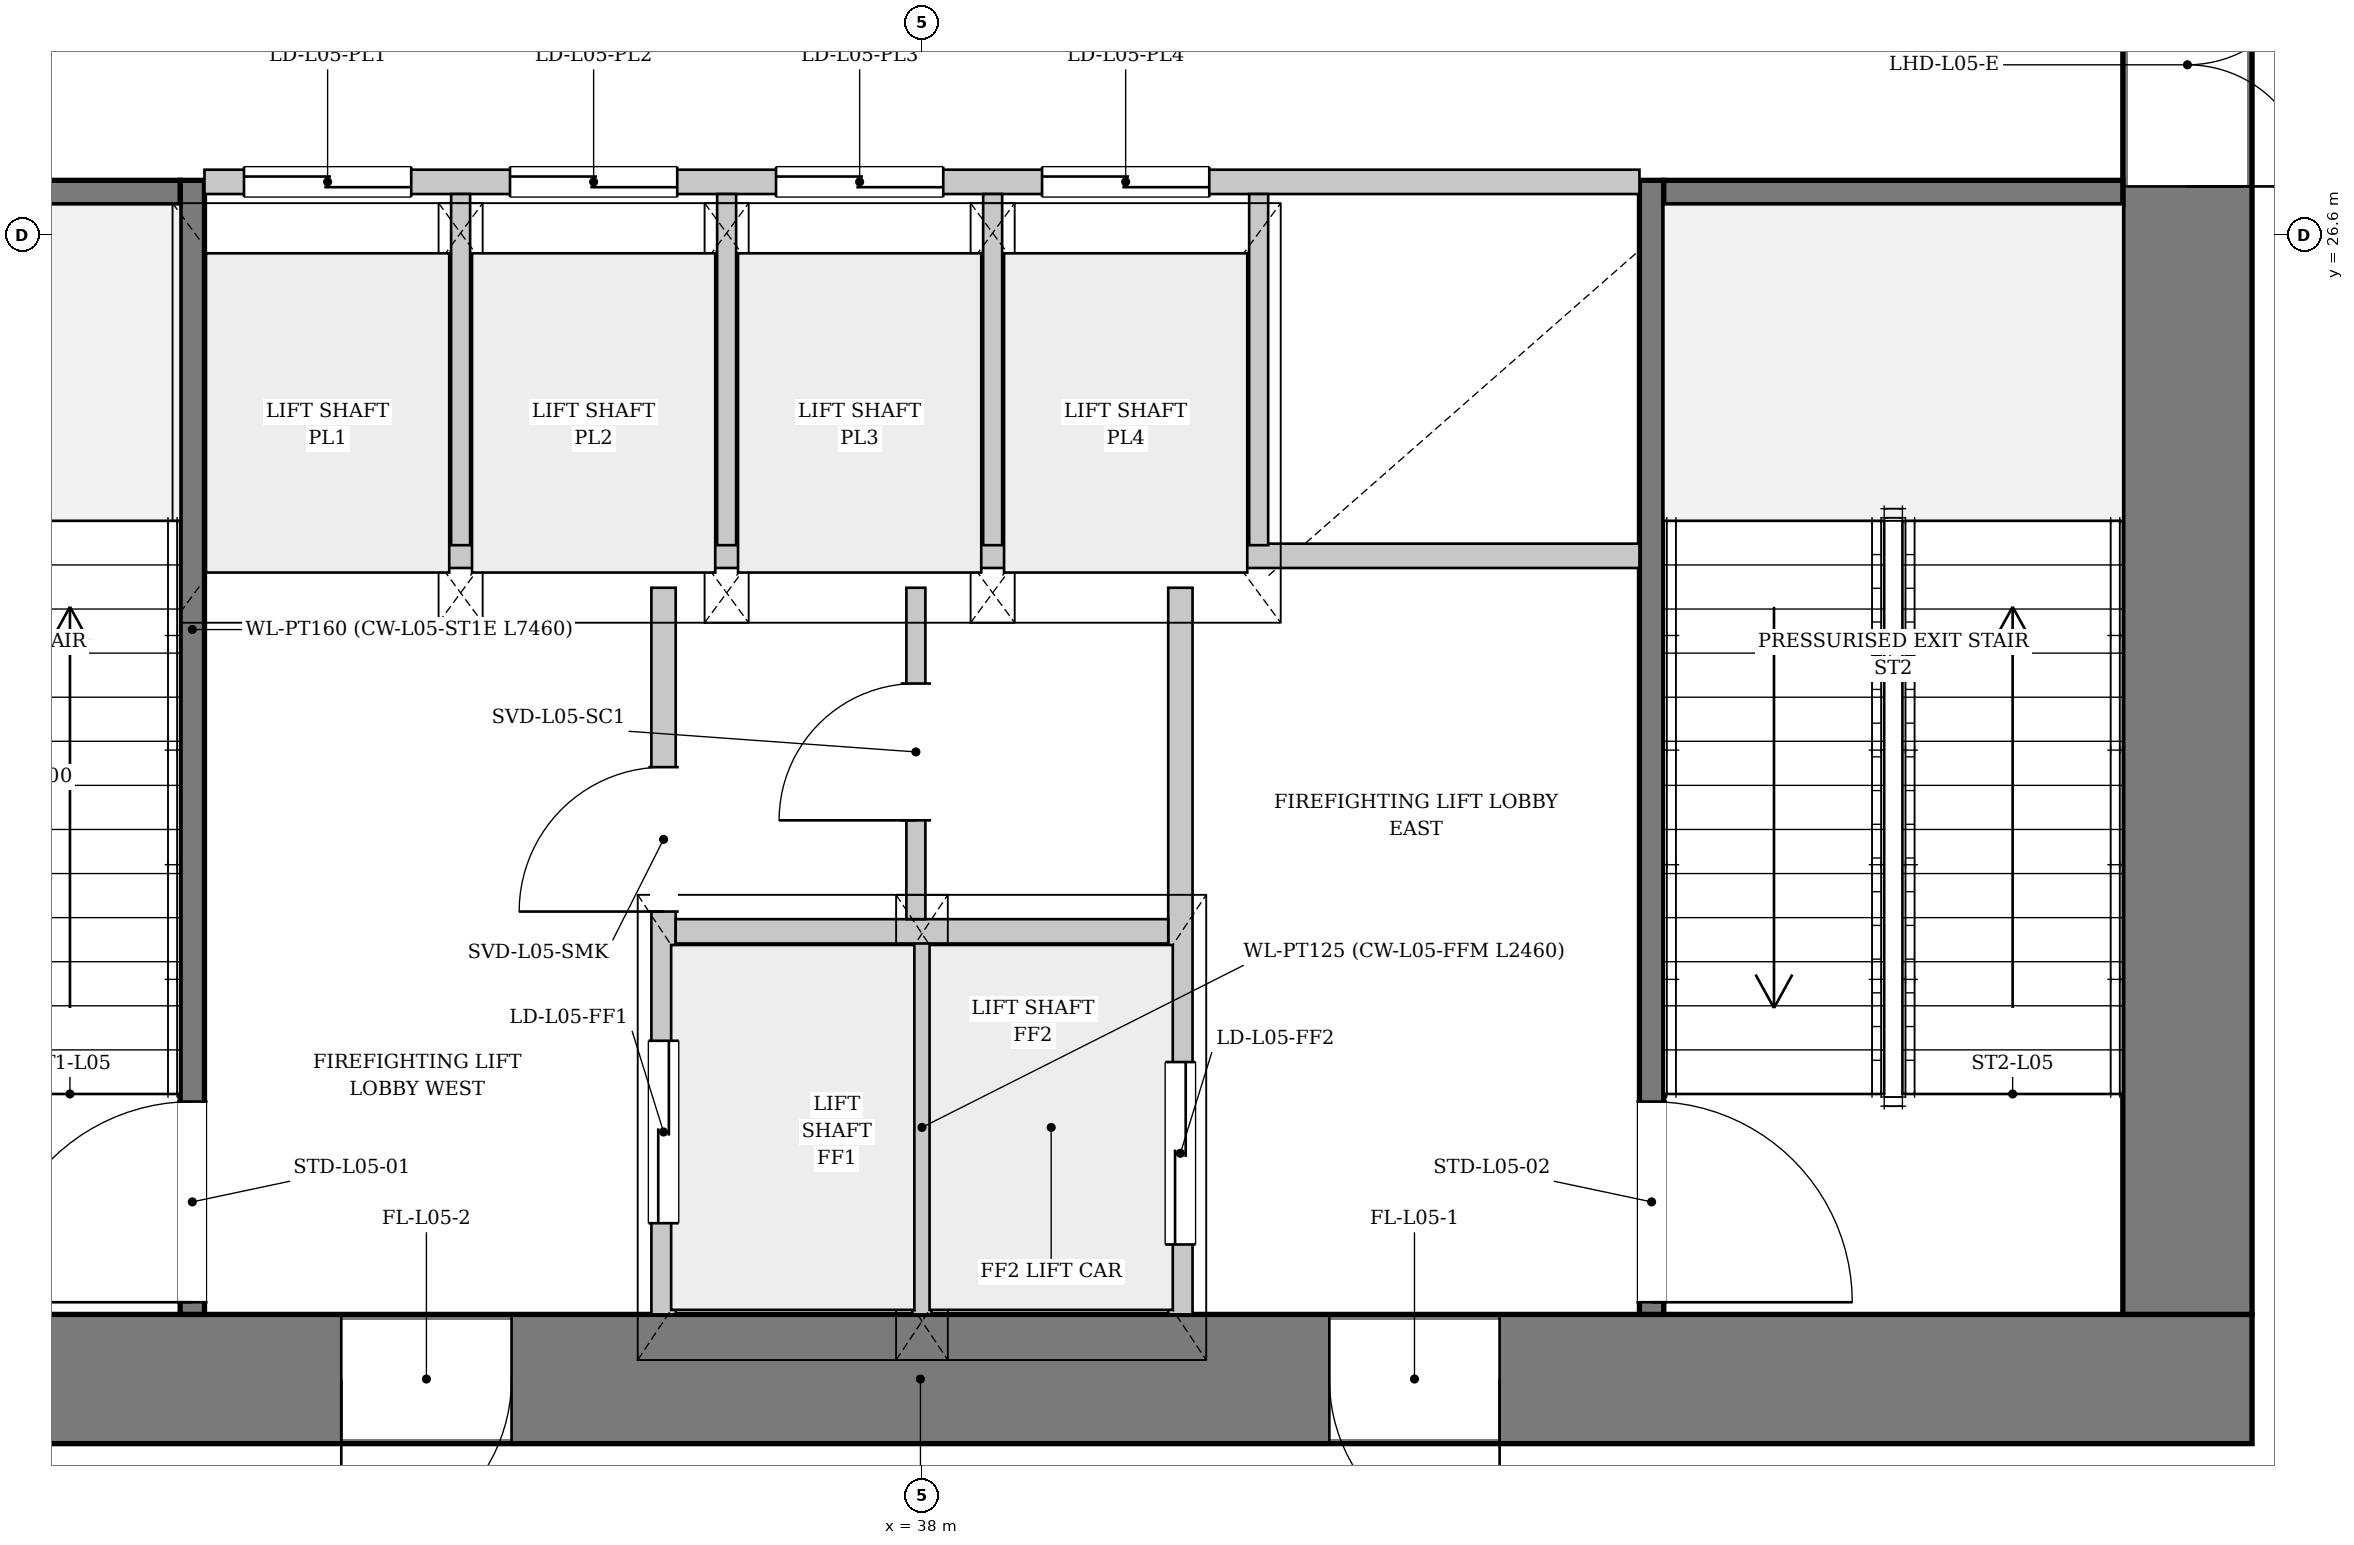
"""IFC4 building model, lengths in metres.
Left out: names, types, materials, properties, quantities, classifications, styles, units other than length and angle.
Written with IfcOpenShell. Run it as: python <this file> out.ifc"""

import sys

from ifc_helpers import new_model, si_unit, direction, frame, frame_2d, origin, place, context, subcontext, project, spatial, rectangle, extrude, source, transform, mapped, element, fill, save


model = new_model("IFC4")
c1 = context("Model", 3, precision=1e-05, world=origin(), true_north=direction((0.0, 1.0)))
c2 = subcontext(c1, "Body", "Model", "MODEL_VIEW")
j1 = project(units=[si_unit("LENGTHUNIT", "METRE"), si_unit("PLANEANGLEUNIT", "RADIAN")], contexts=[c1])
p1 = place(None, origin())
s1 = spatial("IfcSite", under=j1, at=p1, CompositionType="ELEMENT")
p2 = place(p1, origin())
s2 = spatial("IfcBuilding", under=s1, at=p2, CompositionType="ELEMENT")
p3 = place(p2, frame((0.0, 0.0, 24.6)))
s3 = spatial("IfcBuildingStorey", under=s2, at=p3, CompositionType="ELEMENT", Elevation=24.6)
p4 = place(p3, frame((46.75, 19.075, 0.0), z_axis=(0.0, 0.0, 1.0), x_axis=(-1.0, 0.0, 0.0)))
e1 = element("IfcWall", 1, at=p4, inside=s3, PredefinedType="SHEAR", context=c2, shape_type="SweptSolid", body=[
    extrude(rectangle(XDim=17.5, YDim=0.85, at=frame_2d((8.75, 0.0))), origin(), (0.0, 0.0, 1.0), 4.45),
])
p5 = place(p4, frame((4.95, 0.0, 0.0)))
e2 = element("IfcOpeningElement", 2, at=p5, cuts=e1, PredefinedType="OPENING", context=c2, shape_type="SweptSolid", body=[
    extrude(rectangle(XDim=1.12, YDim=2.25, at=frame_2d((0.56, 1.125))), frame((0.0, 0.435, 0.0), z_axis=(0.0, -1.0, 0.0), x_axis=(1.0, 0.0, 0.0)), (0.0, 0.0, 1.0), 0.87),
])
p6 = place(p4, frame((11.45, 0.0, 0.0)))
e3 = element("IfcOpeningElement", 3, at=p6, cuts=e1, PredefinedType="OPENING", context=c2, shape_type="SweptSolid", body=[
    extrude(rectangle(XDim=1.12, YDim=2.25, at=frame_2d((0.56, 1.125))), frame((0.0, 0.435, 0.0), z_axis=(0.0, -1.0, 0.0), x_axis=(1.0, 0.0, 0.0)), (0.0, 0.0, 1.0), 0.87),
])
p7 = place(p3, frame((46.325, 33.7, 0.0), z_axis=(0.0, 0.0, 1.0), x_axis=(0.0, -1.0, 0.0)))
e4 = element("IfcWall", 4, at=p7, inside=s3, PredefinedType="SHEAR", context=c2, shape_type="SweptSolid", body=[
    extrude(rectangle(XDim=14.2, YDim=0.85, at=frame_2d((7.1, 0.0))), origin(), (0.0, 0.0, 1.0), 4.45),
])
p8 = place(p7, frame((5.18, 0.0, 0.0)))
e5 = element("IfcOpeningElement", 5, at=p8, cuts=e4, PredefinedType="OPENING", context=c2, shape_type="SweptSolid", body=[
    extrude(rectangle(XDim=1.6, YDim=2.2, at=frame_2d((0.8, 1.1))), frame((0.0, 0.435, 0.0), z_axis=(0.0, -1.0, 0.0), x_axis=(1.0, 0.0, 0.0)), (0.0, 0.0, 1.0), 0.87),
])
p9 = place(p3, frame((33.2, 19.5, 0.0), z_axis=(0.0, 0.0, 1.0), x_axis=(0.0, 1.0, 0.0)))
e6 = element("IfcWall", 6, at=p9, inside=s3, PredefinedType="PARTITIONING", context=c2, shape_type="SweptSolid", body=[
    extrude(rectangle(XDim=7.46, YDim=0.16, at=frame_2d((3.73, 0.0))), origin(), (0.0, 0.0, 1.0), 4.45),
])
p10 = place(p9, frame((0.08, 0.0, 0.0)))
e7 = element("IfcOpeningElement", 7, at=p10, cuts=e6, PredefinedType="OPENING", context=c2, shape_type="SweptSolid", body=[
    extrude(rectangle(XDim=1.32, YDim=2.2, at=frame_2d((0.66, 1.1))), frame((0.0, 0.09, 0.0), z_axis=(0.0, -1.0, 0.0), x_axis=(1.0, 0.0, 0.0)), (0.0, 0.0, 1.0), 0.18),
])
p11 = place(p3, frame((30.1, 26.88, 0.0), z_axis=(0.0, 0.0, 1.0), x_axis=(1.0, 0.0, 0.0)))
e8 = element("IfcWall", 8, at=p11, inside=s3, PredefinedType="PARTITIONING", context=c2, shape_type="SweptSolid", body=[
    extrude(rectangle(XDim=3.02, YDim=0.16, at=frame_2d((1.51, 0.0))), origin(), (0.0, 0.0, 1.0), 4.45),
])
p12 = place(p3, frame((42.8, 26.96, 0.0), z_axis=(0.0, 0.0, 1.0), x_axis=(0.0, -1.0, 0.0)))
e9 = element("IfcWall", 9, at=p12, inside=s3, PredefinedType="PARTITIONING", context=c2, shape_type="SweptSolid", body=[
    extrude(rectangle(XDim=7.46, YDim=0.16, at=frame_2d((3.73, 0.0))), origin(), (0.0, 0.0, 1.0), 4.45),
])
p13 = place(p12, frame((6.06, 0.0, 0.0)))
e10 = element("IfcOpeningElement", 10, at=p13, cuts=e9, PredefinedType="OPENING", context=c2, shape_type="SweptSolid", body=[
    extrude(rectangle(XDim=1.32, YDim=2.2, at=frame_2d((0.66, 1.1))), frame((0.0, 0.09, 0.0), z_axis=(0.0, -1.0, 0.0), x_axis=(1.0, 0.0, 0.0)), (0.0, 0.0, 1.0), 0.18),
])
p14 = place(p3, frame((42.88, 26.88, 0.0), z_axis=(0.0, 0.0, 1.0), x_axis=(1.0, 0.0, 0.0)))
e11 = element("IfcWall", 11, at=p14, inside=s3, PredefinedType="PARTITIONING", context=c2, shape_type="SweptSolid", body=[
    extrude(rectangle(XDim=3.02, YDim=0.16, at=frame_2d((1.51, 0.0))), origin(), (0.0, 0.0, 1.0), 4.45),
])
p15 = place(p3, frame((36.3, 19.5, 0.0), z_axis=(0.0, 0.0, 1.0), x_axis=(0.0, 1.0, 0.0)))
e12 = element("IfcWall", 12, at=p15, inside=s3, PredefinedType="PARTITIONING", context=c2, shape_type="SweptSolid", body=[
    extrude(rectangle(XDim=4.78, YDim=0.16, at=frame_2d((2.39, 0.0))), origin(), (0.0, 0.0, 1.0), 4.45),
])
p16 = place(p15, frame((0.6, 0.0, 0.0)))
e13 = element("IfcOpeningElement", 13, at=p16, cuts=e12, PredefinedType="OPENING", context=c2, shape_type="SweptSolid", body=[
    extrude(rectangle(XDim=1.2, YDim=2.2, at=frame_2d((0.6, 1.1))), frame((0.0, 0.09, 0.0), z_axis=(0.0, -1.0, 0.0), x_axis=(1.0, 0.0, 0.0)), (0.0, 0.0, 1.0), 0.18),
])
p17 = place(p15, frame((2.65, 0.0, 0.0)))
e14 = element("IfcOpeningElement", 14, at=p17, cuts=e12, PredefinedType="OPENING", context=c2, shape_type="SweptSolid", body=[
    extrude(rectangle(XDim=0.95, YDim=2.1, at=frame_2d((0.475, 1.05))), frame((0.0, 0.09, 0.0), z_axis=(0.0, -1.0, 0.0), x_axis=(1.0, 0.0, 0.0)), (0.0, 0.0, 1.0), 0.18),
])
p18 = place(p3, frame((39.7, 24.28, 0.0), z_axis=(0.0, 0.0, 1.0), x_axis=(0.0, -1.0, 0.0)))
e15 = element("IfcWall", 15, at=p18, inside=s3, PredefinedType="PARTITIONING", context=c2, shape_type="SweptSolid", body=[
    extrude(rectangle(XDim=4.78, YDim=0.16, at=frame_2d((2.39, 0.0))), origin(), (0.0, 0.0, 1.0), 4.45),
])
p19 = place(p18, frame((3.12, 0.0, 0.0)))
e16 = element("IfcOpeningElement", 16, at=p19, cuts=e15, PredefinedType="OPENING", context=c2, shape_type="SweptSolid", body=[
    extrude(rectangle(XDim=1.2, YDim=2.2, at=frame_2d((0.6, 1.1))), frame((0.0, 0.09, 0.0), z_axis=(0.0, -1.0, 0.0), x_axis=(1.0, 0.0, 0.0)), (0.0, 0.0, 1.0), 0.18),
])
p20 = place(p3, frame((38.0, 19.5, 0.0), z_axis=(0.0, 0.0, 1.0), x_axis=(0.0, 1.0, 0.0)))
e17 = element("IfcWall", 17, at=p20, inside=s3, PredefinedType="PARTITIONING", context=c2, shape_type="SweptSolid", body=[
    extrude(rectangle(XDim=2.46, YDim=0.125, at=frame_2d((1.23, 0.0))), origin(), (0.0, 0.0, 1.0), 4.45),
])
p21 = place(p3, frame((36.38, 22.02, 0.0), z_axis=(0.0, 0.0, 1.0), x_axis=(1.0, 0.0, 0.0)))
e18 = element("IfcWall", 18, at=p21, inside=s3, PredefinedType="PARTITIONING", context=c2, shape_type="SweptSolid", body=[
    extrude(rectangle(XDim=3.24, YDim=0.16, at=frame_2d((1.62, 0.0))), origin(), (0.0, 0.0, 1.0), 4.45),
])
p22 = place(p3, frame((33.28, 24.49, 0.0), z_axis=(0.0, 0.0, 1.0), x_axis=(1.0, 0.0, 0.0)))
e19 = element("IfcWall", 19, at=p22, inside=s3, PredefinedType="PARTITIONING", context=c2, shape_type="SweptSolid", body=[
    extrude(rectangle(XDim=9.44, YDim=0.16, at=frame_2d((4.72, 0.0))), origin(), (0.0, 0.0, 1.0), 4.45),
])
p23 = place(p3, frame((37.96, 22.1, 0.0), z_axis=(0.0, 0.0, 1.0), x_axis=(0.0, 1.0, 0.0)))
e20 = element("IfcWall", 20, at=p23, inside=s3, PredefinedType="PARTITIONING", context=c2, shape_type="SweptSolid", body=[
    extrude(rectangle(XDim=2.18, YDim=0.125, at=frame_2d((1.09, 0.0))), origin(), (0.0, 0.0, 1.0), 4.45),
])
p24 = place(p23, frame((0.65, 0.0, 0.0)))
e21 = element("IfcOpeningElement", 21, at=p24, cuts=e20, PredefinedType="OPENING", context=c2, shape_type="SweptSolid", body=[
    extrude(rectangle(XDim=0.9, YDim=2.1, at=frame_2d((0.45, 1.05))), frame((0.0, 0.073, 0.0), z_axis=(0.0, -1.0, 0.0), x_axis=(1.0, 0.0, 0.0)), (0.0, 0.0, 1.0), 0.145),
])
p25 = place(p3, frame((33.28, 26.95, 0.0), z_axis=(0.0, 0.0, 1.0), x_axis=(1.0, 0.0, 0.0)))
e22 = element("IfcWall", 22, at=p25, inside=s3, PredefinedType="PARTITIONING", context=c2, shape_type="SweptSolid", body=[
    extrude(rectangle(XDim=9.44, YDim=0.16, at=frame_2d((4.72, 0.0))), origin(), (0.0, 0.0, 1.0), 4.45),
])
p26 = place(p25, frame((0.26, 0.0, 0.0)))
e23 = element("IfcOpeningElement", 23, at=p26, cuts=e22, PredefinedType="OPENING", context=c2, shape_type="SweptSolid", body=[
    extrude(rectangle(XDim=1.1, YDim=2.2, at=frame_2d((0.55, 1.1))), frame((0.0, 0.09, 0.0), z_axis=(0.0, -1.0, 0.0), x_axis=(1.0, 0.0, 0.0)), (0.0, 0.0, 1.0), 0.18),
])
p27 = place(p25, frame((2.01, 0.0, 0.0)))
e24 = element("IfcOpeningElement", 24, at=p27, cuts=e22, PredefinedType="OPENING", context=c2, shape_type="SweptSolid", body=[
    extrude(rectangle(XDim=1.1, YDim=2.2, at=frame_2d((0.55, 1.1))), frame((0.0, 0.09, 0.0), z_axis=(0.0, -1.0, 0.0), x_axis=(1.0, 0.0, 0.0)), (0.0, 0.0, 1.0), 0.18),
])
p28 = place(p25, frame((3.76, 0.0, 0.0)))
e25 = element("IfcOpeningElement", 25, at=p28, cuts=e22, PredefinedType="OPENING", context=c2, shape_type="SweptSolid", body=[
    extrude(rectangle(XDim=1.1, YDim=2.2, at=frame_2d((0.55, 1.1))), frame((0.0, 0.09, 0.0), z_axis=(0.0, -1.0, 0.0), x_axis=(1.0, 0.0, 0.0)), (0.0, 0.0, 1.0), 0.18),
])
p29 = place(p25, frame((5.51, 0.0, 0.0)))
e26 = element("IfcOpeningElement", 26, at=p29, cuts=e22, PredefinedType="OPENING", context=c2, shape_type="SweptSolid", body=[
    extrude(rectangle(XDim=1.1, YDim=2.2, at=frame_2d((0.55, 1.1))), frame((0.0, 0.09, 0.0), z_axis=(0.0, -1.0, 0.0), x_axis=(1.0, 0.0, 0.0)), (0.0, 0.0, 1.0), 0.18),
])
for number, where, z_axis, x_axis in (
    (27, (34.965, 24.56, 0.0), (0.0, 0.0, 1.0), (0.0, 1.0, 0.0)),
    (28, (36.715, 24.56, 0.0), (0.0, 0.0, 1.0), (0.0, 1.0, 0.0)),
    (29, (38.465, 24.56, 0.0), (0.0, 0.0, 1.0), (0.0, 1.0, 0.0)),
    (30, (40.215, 24.56, 0.0), (0.0, 0.0, 1.0), (0.0, 1.0, 0.0)),
):
    element("IfcWall", number, at=place(p3, frame(where, z_axis=z_axis, x_axis=x_axis)), inside=s3, PredefinedType="PARTITIONING", context=c2, shape_type="SweptSolid", body=[
        extrude(rectangle(XDim=2.31, YDim=0.125, at=frame_2d((1.155, 0.0))), origin(), (0.0, 0.0, 1.0), 4.45),
    ])
m1 = source(origin(), c2, "Body", "SweptSolid", [
    extrude(rectangle(XDim=1.12, YDim=2.25, at=frame_2d((0.56, 1.125))), frame((0.0, 0.025, 0.0), z_axis=(0.0, -1.0, 0.0), x_axis=(1.0, 0.0, 0.0)), (0.0, 0.0, 1.0), 0.05),
])
p30 = place(p5, origin())
e31 = element("IfcDoor", 31, at=p30, inside=s3, OperationType="SINGLE_SWING_LEFT", PredefinedType="DOOR", context=c2, shape_type="MappedRepresentation", body=[
    mapped(m1, transform((0.0, 0.0, 0.0), x_axis=(1.0, 0.0, 0.0), y_axis=(0.0, 1.0, 0.0), z_axis=(0.0, 0.0, 1.0), scale=1.0)),
])
fill(e2, e31)
p31 = place(p6, origin())
e32 = element("IfcDoor", 32, at=p31, inside=s3, OperationType="SINGLE_SWING_RIGHT", PredefinedType="DOOR", context=c2, shape_type="MappedRepresentation", body=[
    mapped(m1, transform((0.0, 0.0, 0.0), x_axis=(1.0, 0.0, 0.0), y_axis=(0.0, 1.0, 0.0), z_axis=(0.0, 0.0, 1.0), scale=1.0)),
])
fill(e3, e32)
m2 = source(origin(), c2, "Body", "SweptSolid", [
    extrude(rectangle(XDim=1.6, YDim=2.2, at=frame_2d((0.8, 1.1))), frame((0.0, 0.025, 0.0), z_axis=(0.0, -1.0, 0.0), x_axis=(1.0, 0.0, 0.0)), (0.0, 0.0, 1.0), 0.05),
])
p32 = place(p8, origin())
e33 = element("IfcDoor", 33, at=p32, inside=s3, OperationType="DOUBLE_DOOR_SINGLE_SWING", PredefinedType="DOOR", context=c2, shape_type="MappedRepresentation", body=[
    mapped(m2, transform((0.0, 0.0, 0.0), x_axis=(1.0, 0.0, 0.0), y_axis=(0.0, 1.0, 0.0), z_axis=(0.0, 0.0, 1.0), scale=1.0)),
])
fill(e5, e33)
m3 = source(origin(), c2, "Body", "SweptSolid", [
    extrude(rectangle(XDim=1.32, YDim=2.2, at=frame_2d((0.66, 1.1))), frame((0.0, 0.025, 0.0), z_axis=(0.0, -1.0, 0.0), x_axis=(1.0, 0.0, 0.0)), (0.0, 0.0, 1.0), 0.05),
])
p33 = place(p10, origin())
e34 = element("IfcDoor", 34, at=p33, inside=s3, OperationType="SINGLE_SWING_LEFT", PredefinedType="DOOR", context=c2, shape_type="MappedRepresentation", body=[
    mapped(m3, transform((0.0, 0.0, 0.0), x_axis=(1.0, 0.0, 0.0), y_axis=(0.0, 1.0, 0.0), z_axis=(0.0, 0.0, 1.0), scale=1.0)),
])
fill(e7, e34)
p34 = place(p13, origin())
e35 = element("IfcDoor", 35, at=p34, inside=s3, OperationType="SINGLE_SWING_RIGHT", PredefinedType="DOOR", context=c2, shape_type="MappedRepresentation", body=[
    mapped(m3, transform((0.0, 0.0, 0.0), x_axis=(1.0, 0.0, 0.0), y_axis=(0.0, 1.0, 0.0), z_axis=(0.0, 0.0, 1.0), scale=1.0)),
])
fill(e10, e35)
m4 = source(origin(), c2, "Body", "SweptSolid", [
    extrude(rectangle(XDim=1.2, YDim=2.2, at=frame_2d((0.6, 1.1))), frame((0.0, 0.025, 0.0), z_axis=(0.0, -1.0, 0.0), x_axis=(1.0, 0.0, 0.0)), (0.0, 0.0, 1.0), 0.05),
])
p35 = place(p16, origin())
e36 = element("IfcDoor", 36, at=p35, inside=s3, OperationType="DOUBLE_DOOR_SLIDING", PredefinedType="DOOR", context=c2, shape_type="MappedRepresentation", body=[
    mapped(m4, transform((0.0, 0.0, 0.0), x_axis=(1.0, 0.0, 0.0), y_axis=(0.0, 1.0, 0.0), z_axis=(0.0, 0.0, 1.0), scale=1.0)),
])
fill(e13, e36)
m5 = source(origin(), c2, "Body", "SweptSolid", [
    extrude(rectangle(XDim=0.95, YDim=2.1, at=frame_2d((0.475, 1.05))), frame((0.0, 0.025, 0.0), z_axis=(0.0, -1.0, 0.0), x_axis=(1.0, 0.0, 0.0)), (0.0, 0.0, 1.0), 0.05),
])
p36 = place(p17, origin())
e37 = element("IfcDoor", 37, at=p36, inside=s3, OperationType="SINGLE_SWING_LEFT", PredefinedType="DOOR", context=c2, shape_type="MappedRepresentation", body=[
    mapped(m5, transform((0.0, 0.0, 0.0), x_axis=(1.0, 0.0, 0.0), y_axis=(0.0, 1.0, 0.0), z_axis=(0.0, 0.0, 1.0), scale=1.0)),
])
fill(e14, e37)
m6 = source(origin(), c2, "Body", "SweptSolid", [
    extrude(rectangle(XDim=0.9, YDim=2.1, at=frame_2d((0.45, 1.05))), frame((0.0, 0.025, 0.0), z_axis=(0.0, -1.0, 0.0), x_axis=(1.0, 0.0, 0.0)), (0.0, 0.0, 1.0), 0.05),
])
p37 = place(p24, origin())
e38 = element("IfcDoor", 38, at=p37, inside=s3, OperationType="SINGLE_SWING_LEFT", PredefinedType="DOOR", context=c2, shape_type="MappedRepresentation", body=[
    mapped(m6, transform((0.0, 0.0, 0.0), x_axis=(1.0, 0.0, 0.0), y_axis=(0.0, 1.0, 0.0), z_axis=(0.0, 0.0, 1.0), scale=1.0)),
])
fill(e21, e38)
p38 = place(p19, origin())
e39 = element("IfcDoor", 39, at=p38, inside=s3, OperationType="DOUBLE_DOOR_SLIDING", PredefinedType="DOOR", context=c2, shape_type="MappedRepresentation", body=[
    mapped(m4, transform((0.0, 0.0, 0.0), x_axis=(1.0, 0.0, 0.0), y_axis=(0.0, 1.0, 0.0), z_axis=(0.0, 0.0, 1.0), scale=1.0)),
])
fill(e16, e39)
m7 = source(origin(), c2, "Body", "SweptSolid", [
    extrude(rectangle(XDim=1.1, YDim=2.2, at=frame_2d((0.55, 1.1))), frame((0.0, 0.025, 0.0), z_axis=(0.0, -1.0, 0.0), x_axis=(1.0, 0.0, 0.0)), (0.0, 0.0, 1.0), 0.05),
])
p39 = place(p26, origin())
e40 = element("IfcDoor", 40, at=p39, inside=s3, OperationType="DOUBLE_DOOR_SLIDING", PredefinedType="DOOR", context=c2, shape_type="MappedRepresentation", body=[
    mapped(m7, transform((0.0, 0.0, 0.0), x_axis=(1.0, 0.0, 0.0), y_axis=(0.0, 1.0, 0.0), z_axis=(0.0, 0.0, 1.0), scale=1.0)),
])
fill(e23, e40)
p40 = place(p27, origin())
e41 = element("IfcDoor", 41, at=p40, inside=s3, OperationType="DOUBLE_DOOR_SLIDING", PredefinedType="DOOR", context=c2, shape_type="MappedRepresentation", body=[
    mapped(m7, transform((0.0, 0.0, 0.0), x_axis=(1.0, 0.0, 0.0), y_axis=(0.0, 1.0, 0.0), z_axis=(0.0, 0.0, 1.0), scale=1.0)),
])
fill(e24, e41)
p41 = place(p28, origin())
e42 = element("IfcDoor", 42, at=p41, inside=s3, OperationType="DOUBLE_DOOR_SLIDING", PredefinedType="DOOR", context=c2, shape_type="MappedRepresentation", body=[
    mapped(m7, transform((0.0, 0.0, 0.0), x_axis=(1.0, 0.0, 0.0), y_axis=(0.0, 1.0, 0.0), z_axis=(0.0, 0.0, 1.0), scale=1.0)),
])
fill(e25, e42)
p42 = place(p29, origin())
e43 = element("IfcDoor", 43, at=p42, inside=s3, OperationType="DOUBLE_DOOR_SLIDING", PredefinedType="DOOR", context=c2, shape_type="MappedRepresentation", body=[
    mapped(m7, transform((0.0, 0.0, 0.0), x_axis=(1.0, 0.0, 0.0), y_axis=(0.0, 1.0, 0.0), z_axis=(0.0, 0.0, 1.0), scale=1.0)),
])
fill(e26, e43)
save(model, sys.argv[1])
